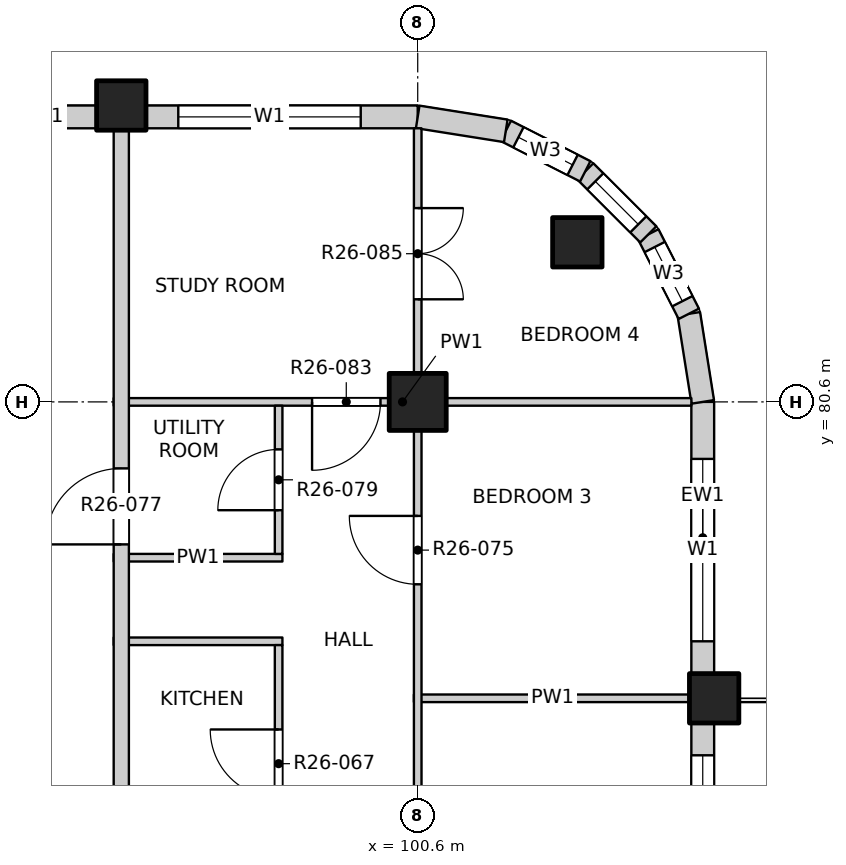
"""IFC4 building model, lengths in metres.
Left out: names, types, materials, properties, quantities, classifications, styles, units other than length and angle.
Written with IfcOpenShell. Run it as: python <this file> out.ifc"""

import sys

from ifc_helpers import new_model, si_unit, direction, frame, frame_2d, origin, origin_2d, place, context, subcontext, project, spatial, rectangle, extrude, element, fill, save


model = new_model("IFC4")
c1 = context("Model", 3, precision=1e-05, world=origin(), true_north=direction((0.0, 1.0)))
c2 = subcontext(c1, "Body", "Model", "MODEL_VIEW")
j1 = project(units=[si_unit("LENGTHUNIT", "METRE"), si_unit("PLANEANGLEUNIT", "RADIAN")], contexts=[c1])
p1 = place(None, origin())
s1 = spatial("IfcSite", under=j1, at=p1, CompositionType="ELEMENT")
p2 = place(p1, origin())
s2 = spatial("IfcBuilding", under=s1, at=p2, CompositionType="ELEMENT")
p3 = place(p2, frame((0.0, 0.0, 259.6)))
s3 = spatial("IfcBuildingStorey", under=s2, at=p3, CompositionType="ELEMENT", Elevation=259.6)
for number, where, z_axis, x_axis in (
    (1, (102.7, 82.7, -0.25), (0.0, 0.0, 1.0), (1.0, 0.0, 0.0)),
    (2, (104.5, 76.7, -0.25), (0.0, 0.0, 1.0), (1.0, 0.0, 0.0)),
    (3, (96.7, 84.5, -0.25), (0.0, 0.0, 1.0), (1.0, 0.0, 0.0)),
):
    element("IfcColumn", number, at=place(p3, frame(where, z_axis=z_axis, x_axis=x_axis)), inside=s3, PredefinedType="COLUMN", context=c2, shape_type="SweptSolid", body=[
        extrude(rectangle(XDim=0.65, YDim=0.65, at=origin_2d()), origin(), (0.0, 0.0, 1.0), 3.4),
    ])
p4 = place(p3, frame((100.6, 80.6, -0.25), z_axis=(0.0, 0.0, 1.0), x_axis=(1.0, 0.0, 0.0)))
e4 = element("IfcColumn", 4, at=p4, inside=s3, PredefinedType="COLUMN", context=c2, shape_type="SweptSolid", body=[
    extrude(rectangle(XDim=0.75, YDim=0.75, at=origin_2d()), origin(), (0.0, 0.0, 1.0), 3.4),
])
p5 = place(p3, frame((104.35, 69.225, 0.0), z_axis=(0.0, 0.0, 1.0), x_axis=(0.0, 1.0, 0.0)))
e5 = element("IfcWall", 5, at=p5, inside=s3, PredefinedType="SOLIDWALL", context=c2, shape_type="SweptSolid", body=[
    extrude(rectangle(XDim=7.15, YDim=0.3, at=frame_2d((3.575, 0.0))), origin(), (0.0, 0.0, 1.0), 3.15),
])
p6 = place(p5, frame((0.725, 0.0, 0.0)))
e6 = element("IfcOpeningElement", 6, at=p6, cuts=e5, PredefinedType="OPENING", context=c2, shape_type="SweptSolid", body=[
    extrude(rectangle(XDim=1.8, YDim=2.4, at=frame_2d((0.9, 1.2))), frame((0.0, 0.16, 0.0), z_axis=(0.0, -1.0, 0.0), x_axis=(1.0, 0.0, 0.0)), (0.0, 0.0, 1.0), 0.32),
])
p7 = place(p5, frame((4.325, 0.0, 0.9)))
e7 = element("IfcOpeningElement", 7, at=p7, cuts=e5, PredefinedType="OPENING", context=c2, shape_type="SweptSolid", body=[
    extrude(rectangle(XDim=2.4, YDim=1.8, at=frame_2d((1.2, 0.9))), frame((0.0, 0.16, 0.0), z_axis=(0.0, -1.0, 0.0), x_axis=(1.0, 0.0, 0.0)), (0.0, 0.0, 1.0), 0.32),
])
p8 = place(p3, frame((104.35, 77.025, 0.0), z_axis=(0.0, 0.0, 1.0), x_axis=(0.0, 1.0, 0.0)))
e8 = element("IfcWall", 8, at=p8, inside=s3, PredefinedType="SOLIDWALL", context=c2, shape_type="SweptSolid", body=[
    extrude(rectangle(XDim=3.575, YDim=0.3, at=frame_2d((1.788, 0.0))), origin(), (0.0, 0.0, 1.0), 3.15),
])
p9 = place(p8, frame((0.425, 0.0, 0.9)))
e9 = element("IfcOpeningElement", 9, at=p9, cuts=e8, PredefinedType="OPENING", context=c2, shape_type="SweptSolid", body=[
    extrude(rectangle(XDim=2.4, YDim=1.8, at=frame_2d((1.2, 0.9))), frame((0.0, 0.16, 0.0), z_axis=(0.0, -1.0, 0.0), x_axis=(1.0, 0.0, 0.0)), (0.0, 0.0, 1.0), 0.32),
])
p10 = place(p3, frame((94.95, 84.35, 0.0), z_axis=(0.0, 0.0, 1.0), x_axis=(1.0, 0.0, 0.0)))
e10 = element("IfcWall", 10, at=p10, inside=s3, PredefinedType="SOLIDWALL", context=c2, shape_type="SweptSolid", body=[
    extrude(rectangle(XDim=1.425, YDim=0.3, at=frame_2d((0.712, 0.0))), origin(), (0.0, 0.0, 1.0), 3.15),
])
p11 = place(p3, frame((97.025, 84.35, 0.0), z_axis=(0.0, 0.0, 1.0), x_axis=(1.0, 0.0, 0.0)))
e11 = element("IfcWall", 11, at=p11, inside=s3, PredefinedType="SOLIDWALL", context=c2, shape_type="SweptSolid", body=[
    extrude(rectangle(XDim=3.575, YDim=0.3, at=frame_2d((1.788, 0.0))), origin(), (0.0, 0.0, 1.0), 3.15),
])
p12 = place(p11, frame((0.425, 0.0, 0.9)))
e12 = element("IfcOpeningElement", 12, at=p12, cuts=e11, PredefinedType="OPENING", context=c2, shape_type="SweptSolid", body=[
    extrude(rectangle(XDim=2.4, YDim=1.8, at=frame_2d((1.2, 0.9))), frame((0.0, 0.16, 0.0), z_axis=(0.0, -1.0, 0.0), x_axis=(1.0, 0.0, 0.0)), (0.0, 0.0, 1.0), 0.32),
])
p13 = place(p3, frame((104.35, 80.6, 0.0), z_axis=(0.0, 0.0, 1.0), x_axis=(-0.156496880861, 0.987678452879, 0.0)))
e13 = element("IfcWall", 13, at=p13, inside=s3, PredefinedType="SOLIDWALL", context=c2, shape_type="SweptSolid", body=[
    extrude(rectangle(XDim=1.173, YDim=0.3, at=frame_2d((0.586, 0.0))), origin(), (0.0, 0.0, 1.0), 3.15),
])
p14 = place(p3, frame((104.167, 81.759, 0.0), z_axis=(0.0, 0.0, 1.0), x_axis=(-0.454025524128, 0.890988677504, 0.0)))
e14 = element("IfcWall", 14, at=p14, inside=s3, PredefinedType="SOLIDWALL", context=c2, shape_type="SweptSolid", body=[
    extrude(rectangle(XDim=1.173, YDim=0.3, at=frame_2d((0.587, 0.0))), origin(), (0.0, 0.0, 1.0), 3.15),
])
p15 = place(p14, frame((0.187, 0.0, 0.9)))
e15 = element("IfcOpeningElement", 15, at=p15, cuts=e14, PredefinedType="OPENING", context=c2, shape_type="SweptSolid", body=[
    extrude(rectangle(XDim=0.8, YDim=1.2, at=frame_2d((0.4, 0.6))), frame((0.0, 0.16, 0.0), z_axis=(0.0, -1.0, 0.0), x_axis=(1.0, 0.0, 0.0)), (0.0, 0.0, 1.0), 0.32),
])
p16 = place(p3, frame((103.634, 82.804, 0.0), z_axis=(0.0, 0.0, 1.0), x_axis=(-0.707106781187, 0.707106781187, 0.0)))
e16 = element("IfcWall", 16, at=p16, inside=s3, PredefinedType="SOLIDWALL", context=c2, shape_type="SweptSolid", body=[
    extrude(rectangle(XDim=1.173, YDim=0.3, at=frame_2d((0.586, 0.0))), origin(), (0.0, 0.0, 1.0), 3.15),
])
p17 = place(p16, frame((0.187, 0.0, 0.9)))
e17 = element("IfcOpeningElement", 17, at=p17, cuts=e16, PredefinedType="OPENING", context=c2, shape_type="SweptSolid", body=[
    extrude(rectangle(XDim=0.8, YDim=1.2, at=frame_2d((0.4, 0.6))), frame((0.0, 0.16, 0.0), z_axis=(0.0, -1.0, 0.0), x_axis=(1.0, 0.0, 0.0)), (0.0, 0.0, 1.0), 0.32),
])
p18 = place(p3, frame((102.804, 83.634, 0.0), z_axis=(0.0, 0.0, 1.0), x_axis=(-0.890988677504, 0.454025524128, 0.0)))
e18 = element("IfcWall", 18, at=p18, inside=s3, PredefinedType="SOLIDWALL", context=c2, shape_type="SweptSolid", body=[
    extrude(rectangle(XDim=1.173, YDim=0.3, at=frame_2d((0.587, 0.0))), origin(), (0.0, 0.0, 1.0), 3.15),
])
p19 = place(p18, frame((0.187, 0.0, 0.9)))
e19 = element("IfcOpeningElement", 19, at=p19, cuts=e18, PredefinedType="OPENING", context=c2, shape_type="SweptSolid", body=[
    extrude(rectangle(XDim=0.8, YDim=1.2, at=frame_2d((0.4, 0.6))), frame((0.0, 0.16, 0.0), z_axis=(0.0, -1.0, 0.0), x_axis=(1.0, 0.0, 0.0)), (0.0, 0.0, 1.0), 0.32),
])
p20 = place(p3, frame((101.759, 84.167, 0.0), z_axis=(0.0, 0.0, 1.0), x_axis=(-0.987678452879, 0.156496880861, 0.0)))
e20 = element("IfcWall", 20, at=p20, inside=s3, PredefinedType="SOLIDWALL", context=c2, shape_type="SweptSolid", body=[
    extrude(rectangle(XDim=1.173, YDim=0.3, at=frame_2d((0.586, 0.0))), origin(), (0.0, 0.0, 1.0), 3.15),
])
p21 = place(p3, frame((100.55, 76.7, 0.0), z_axis=(0.0, 0.0, 1.0), x_axis=(1.0, 0.0, 0.0)))
e21 = element("IfcWall", 21, at=p21, inside=s3, PredefinedType="PARTITIONING", context=c2, shape_type="SweptSolid", body=[
    extrude(rectangle(XDim=3.65, YDim=0.1, at=frame_2d((1.825, 0.0))), origin(), (0.0, 0.0, 1.0), 3.15),
])
for number, where, z_axis, x_axis in (
    (22, (96.6, 77.45, 0.0), (0.0, 0.0, 1.0), (1.0, 0.0, 0.0)),
    (23, (96.6, 78.55, 0.0), (0.0, 0.0, 1.0), (1.0, 0.0, 0.0)),
):
    element("IfcWall", number, at=place(p3, frame(where, z_axis=z_axis, x_axis=x_axis)), inside=s3, PredefinedType="PARTITIONING", context=c2, shape_type="SweptSolid", body=[
        extrude(rectangle(XDim=2.22, YDim=0.1, at=frame_2d((1.11, 0.0))), origin(), (0.0, 0.0, 1.0), 3.15),
    ])
p22 = place(p3, frame((96.6, 80.6, 0.0), z_axis=(0.0, 0.0, 1.0), x_axis=(1.0, 0.0, 0.0)))
e24 = element("IfcWall", 24, at=p22, inside=s3, PredefinedType="PARTITIONING", context=c2, shape_type="SweptSolid", body=[
    extrude(rectangle(XDim=7.6, YDim=0.1, at=frame_2d((3.8, 0.0))), origin(), (0.0, 0.0, 1.0), 3.15),
])
p23 = place(p22, frame((2.61, 0.0, 0.0)))
e25 = element("IfcOpeningElement", 25, at=p23, cuts=e24, PredefinedType="OPENING", context=c2, shape_type="SweptSolid", body=[
    extrude(rectangle(XDim=0.9, YDim=2.1, at=frame_2d((0.45, 1.05))), frame((0.0, 0.06, 0.0), z_axis=(0.0, -1.0, 0.0), x_axis=(1.0, 0.0, 0.0)), (0.0, 0.0, 1.0), 0.12),
])
p24 = place(p3, frame((96.7, 49.5, 0.0), z_axis=(0.0, 0.0, 1.0), x_axis=(0.0, 1.0, 0.0)))
e26 = element("IfcWall", 26, at=p24, inside=s3, PredefinedType="PARTITIONING", context=c2, shape_type="SweptSolid", body=[
    extrude(rectangle(XDim=34.7, YDim=0.2, at=frame_2d((17.35, 0.0))), origin(), (0.0, 0.0, 1.0), 3.15),
])
p25 = place(p24, frame((10.425, 0.0, 0.0)))
e27 = element("IfcOpeningElement", 27, at=p25, cuts=e26, PredefinedType="OPENING", context=c2, shape_type="SweptSolid", body=[
    extrude(rectangle(XDim=1.0, YDim=2.1, at=frame_2d((0.5, 1.05))), frame((0.0, 0.11, 0.0), z_axis=(0.0, -1.0, 0.0), x_axis=(1.0, 0.0, 0.0)), (0.0, 0.0, 1.0), 0.22),
])
p26 = place(p24, frame((29.225, 0.0, 0.0)))
e28 = element("IfcOpeningElement", 28, at=p26, cuts=e26, PredefinedType="OPENING", context=c2, shape_type="SweptSolid", body=[
    extrude(rectangle(XDim=1.0, YDim=2.1, at=frame_2d((0.5, 1.05))), frame((0.0, 0.11, 0.0), z_axis=(0.0, -1.0, 0.0), x_axis=(1.0, 0.0, 0.0)), (0.0, 0.0, 1.0), 0.22),
])
p27 = place(p3, frame((98.77, 59.8, 0.0), z_axis=(0.0, 0.0, 1.0), x_axis=(0.0, 1.0, 0.0)))
e29 = element("IfcWall", 29, at=p27, inside=s3, PredefinedType="PARTITIONING", context=c2, shape_type="SweptSolid", body=[
    extrude(rectangle(XDim=17.6, YDim=0.1, at=frame_2d((8.8, 0.0))), origin(), (0.0, 0.0, 1.0), 3.15),
])
p28 = place(p27, frame((0.975, 0.0, 0.0)))
e30 = element("IfcOpeningElement", 30, at=p28, cuts=e29, PredefinedType="OPENING", context=c2, shape_type="SweptSolid", body=[
    extrude(rectangle(XDim=0.9, YDim=2.1, at=frame_2d((0.45, 1.05))), frame((0.0, 0.06, 0.0), z_axis=(0.0, -1.0, 0.0), x_axis=(1.0, 0.0, 0.0)), (0.0, 0.0, 1.0), 0.12),
])
p29 = place(p27, frame((3.65, 0.0, 0.0)))
e31 = element("IfcOpeningElement", 31, at=p29, cuts=e29, PredefinedType="OPENING", context=c2, shape_type="SweptSolid", body=[
    extrude(rectangle(XDim=0.8, YDim=2.1, at=frame_2d((0.4, 1.05))), frame((0.0, 0.06, 0.0), z_axis=(0.0, -1.0, 0.0), x_axis=(1.0, 0.0, 0.0)), (0.0, 0.0, 1.0), 0.12),
])
p30 = place(p27, frame((6.025, 0.0, 0.0)))
e32 = element("IfcOpeningElement", 32, at=p30, cuts=e29, PredefinedType="OPENING", context=c2, shape_type="SweptSolid", body=[
    extrude(rectangle(XDim=0.8, YDim=2.1, at=frame_2d((0.4, 1.05))), frame((0.0, 0.06, 0.0), z_axis=(0.0, -1.0, 0.0), x_axis=(1.0, 0.0, 0.0)), (0.0, 0.0, 1.0), 0.12),
])
p31 = place(p27, frame((8.1, 0.0, 0.0)))
e33 = element("IfcOpeningElement", 33, at=p31, cuts=e29, PredefinedType="OPENING", context=c2, shape_type="SweptSolid", body=[
    extrude(rectangle(XDim=0.9, YDim=2.1, at=frame_2d((0.45, 1.05))), frame((0.0, 0.06, 0.0), z_axis=(0.0, -1.0, 0.0), x_axis=(1.0, 0.0, 0.0)), (0.0, 0.0, 1.0), 0.12),
])
p32 = place(p27, frame((10.265, 0.0, 0.0)))
e34 = element("IfcOpeningElement", 34, at=p32, cuts=e29, PredefinedType="OPENING", context=c2, shape_type="SweptSolid", body=[
    extrude(rectangle(XDim=0.9, YDim=2.1, at=frame_2d((0.45, 1.05))), frame((0.0, 0.06, 0.0), z_axis=(0.0, -1.0, 0.0), x_axis=(1.0, 0.0, 0.0)), (0.0, 0.0, 1.0), 0.12),
])
p33 = place(p27, frame((12.805, 0.0, 0.0)))
e35 = element("IfcOpeningElement", 35, at=p33, cuts=e29, PredefinedType="OPENING", context=c2, shape_type="SweptSolid", body=[
    extrude(rectangle(XDim=0.8, YDim=2.1, at=frame_2d((0.4, 1.05))), frame((0.0, 0.06, 0.0), z_axis=(0.0, -1.0, 0.0), x_axis=(1.0, 0.0, 0.0)), (0.0, 0.0, 1.0), 0.12),
])
p34 = place(p27, frame((15.59, 0.0, 0.0)))
e36 = element("IfcOpeningElement", 36, at=p34, cuts=e29, PredefinedType="OPENING", context=c2, shape_type="SweptSolid", body=[
    extrude(rectangle(XDim=0.9, YDim=2.1, at=frame_2d((0.45, 1.05))), frame((0.0, 0.06, 0.0), z_axis=(0.0, -1.0, 0.0), x_axis=(1.0, 0.0, 0.0)), (0.0, 0.0, 1.0), 0.12),
])
p35 = place(p3, frame((98.77, 78.6, 0.0), z_axis=(0.0, 0.0, 1.0), x_axis=(0.0, 1.0, 0.0)))
e37 = element("IfcWall", 37, at=p35, inside=s3, PredefinedType="PARTITIONING", context=c2, shape_type="SweptSolid", body=[
    extrude(rectangle(XDim=1.95, YDim=0.1, at=frame_2d((0.975, 0.0))), origin(), (0.0, 0.0, 1.0), 3.15),
])
p36 = place(p35, frame((0.575, 0.0, 0.0)))
e38 = element("IfcOpeningElement", 38, at=p36, cuts=e37, PredefinedType="OPENING", context=c2, shape_type="SweptSolid", body=[
    extrude(rectangle(XDim=0.8, YDim=2.1, at=frame_2d((0.4, 1.05))), frame((0.0, 0.06, 0.0), z_axis=(0.0, -1.0, 0.0), x_axis=(1.0, 0.0, 0.0)), (0.0, 0.0, 1.0), 0.12),
])
p37 = place(p3, frame((100.6, 45.8, 0.0), z_axis=(0.0, 0.0, 1.0), x_axis=(0.0, 1.0, 0.0)))
e39 = element("IfcWall", 39, at=p37, inside=s3, PredefinedType="PARTITIONING", context=c2, shape_type="SweptSolid", body=[
    extrude(rectangle(XDim=38.4, YDim=0.1, at=frame_2d((19.2, 0.0))), origin(), (0.0, 0.0, 1.0), 3.15),
])
p38 = place(p37, frame((1.05, 0.0, 0.0)))
e40 = element("IfcOpeningElement", 40, at=p38, cuts=e39, PredefinedType="OPENING", context=c2, shape_type="SweptSolid", body=[
    extrude(rectangle(XDim=1.2, YDim=2.1, at=frame_2d((0.6, 1.05))), frame((0.0, 0.06, 0.0), z_axis=(0.0, -1.0, 0.0), x_axis=(1.0, 0.0, 0.0)), (0.0, 0.0, 1.0), 0.12),
])
p39 = place(p37, frame((5.1, 0.0, 0.0)))
e41 = element("IfcOpeningElement", 41, at=p39, cuts=e39, PredefinedType="OPENING", context=c2, shape_type="SweptSolid", body=[
    extrude(rectangle(XDim=0.9, YDim=2.1, at=frame_2d((0.45, 1.05))), frame((0.0, 0.06, 0.0), z_axis=(0.0, -1.0, 0.0), x_axis=(1.0, 0.0, 0.0)), (0.0, 0.0, 1.0), 0.12),
])
p40 = place(p37, frame((9.0, 0.0, 0.0)))
e42 = element("IfcOpeningElement", 42, at=p40, cuts=e39, PredefinedType="OPENING", context=c2, shape_type="SweptSolid", body=[
    extrude(rectangle(XDim=0.9, YDim=2.1, at=frame_2d((0.45, 1.05))), frame((0.0, 0.06, 0.0), z_axis=(0.0, -1.0, 0.0), x_axis=(1.0, 0.0, 0.0)), (0.0, 0.0, 1.0), 0.12),
])
p41 = place(p37, frame((12.9, 0.0, 0.0)))
e43 = element("IfcOpeningElement", 43, at=p41, cuts=e39, PredefinedType="OPENING", context=c2, shape_type="SweptSolid", body=[
    extrude(rectangle(XDim=0.9, YDim=2.1, at=frame_2d((0.45, 1.05))), frame((0.0, 0.06, 0.0), z_axis=(0.0, -1.0, 0.0), x_axis=(1.0, 0.0, 0.0)), (0.0, 0.0, 1.0), 0.12),
])
p42 = place(p37, frame((16.8, 0.0, 0.0)))
e44 = element("IfcOpeningElement", 44, at=p42, cuts=e39, PredefinedType="OPENING", context=c2, shape_type="SweptSolid", body=[
    extrude(rectangle(XDim=0.9, YDim=2.1, at=frame_2d((0.45, 1.05))), frame((0.0, 0.06, 0.0), z_axis=(0.0, -1.0, 0.0), x_axis=(1.0, 0.0, 0.0)), (0.0, 0.0, 1.0), 0.12),
])
p43 = place(p37, frame((20.7, 0.0, 0.0)))
e45 = element("IfcOpeningElement", 45, at=p43, cuts=e39, PredefinedType="OPENING", context=c2, shape_type="SweptSolid", body=[
    extrude(rectangle(XDim=0.9, YDim=2.1, at=frame_2d((0.45, 1.05))), frame((0.0, 0.06, 0.0), z_axis=(0.0, -1.0, 0.0), x_axis=(1.0, 0.0, 0.0)), (0.0, 0.0, 1.0), 0.12),
])
p44 = place(p37, frame((24.6, 0.0, 0.0)))
e46 = element("IfcOpeningElement", 46, at=p44, cuts=e39, PredefinedType="OPENING", context=c2, shape_type="SweptSolid", body=[
    extrude(rectangle(XDim=0.9, YDim=2.1, at=frame_2d((0.45, 1.05))), frame((0.0, 0.06, 0.0), z_axis=(0.0, -1.0, 0.0), x_axis=(1.0, 0.0, 0.0)), (0.0, 0.0, 1.0), 0.12),
])
p45 = place(p37, frame((28.5, 0.0, 0.0)))
e47 = element("IfcOpeningElement", 47, at=p45, cuts=e39, PredefinedType="OPENING", context=c2, shape_type="SweptSolid", body=[
    extrude(rectangle(XDim=0.9, YDim=2.1, at=frame_2d((0.45, 1.05))), frame((0.0, 0.06, 0.0), z_axis=(0.0, -1.0, 0.0), x_axis=(1.0, 0.0, 0.0)), (0.0, 0.0, 1.0), 0.12),
])
p46 = place(p37, frame((32.4, 0.0, 0.0)))
e48 = element("IfcOpeningElement", 48, at=p46, cuts=e39, PredefinedType="OPENING", context=c2, shape_type="SweptSolid", body=[
    extrude(rectangle(XDim=0.9, YDim=2.1, at=frame_2d((0.45, 1.05))), frame((0.0, 0.06, 0.0), z_axis=(0.0, -1.0, 0.0), x_axis=(1.0, 0.0, 0.0)), (0.0, 0.0, 1.0), 0.12),
])
p47 = place(p37, frame((36.15, 0.0, 0.0)))
e49 = element("IfcOpeningElement", 49, at=p47, cuts=e39, PredefinedType="OPENING", context=c2, shape_type="SweptSolid", body=[
    extrude(rectangle(XDim=1.2, YDim=2.1, at=frame_2d((0.6, 1.05))), frame((0.0, 0.06, 0.0), z_axis=(0.0, -1.0, 0.0), x_axis=(1.0, 0.0, 0.0)), (0.0, 0.0, 1.0), 0.12),
])
p48 = place(p7, origin())
e50 = element("IfcWindow", 50, at=p48, inside=s3, PartitioningType="DOUBLE_PANEL_VERTICAL", PredefinedType="WINDOW", context=c2, shape_type="SweptSolid", body=[
    extrude(rectangle(XDim=2.4, YDim=1.8, at=frame_2d((1.2, 0.9))), frame((0.0, 0.03, 0.0), z_axis=(0.0, -1.0, 0.0), x_axis=(1.0, 0.0, 0.0)), (0.0, 0.0, 1.0), 0.06),
])
fill(e7, e50)
p49 = place(p9, origin())
e51 = element("IfcWindow", 51, at=p49, inside=s3, PartitioningType="DOUBLE_PANEL_VERTICAL", PredefinedType="WINDOW", context=c2, shape_type="SweptSolid", body=[
    extrude(rectangle(XDim=2.4, YDim=1.8, at=frame_2d((1.2, 0.9))), frame((0.0, 0.03, 0.0), z_axis=(0.0, -1.0, 0.0), x_axis=(1.0, 0.0, 0.0)), (0.0, 0.0, 1.0), 0.06),
])
fill(e9, e51)
p50 = place(p12, origin())
e52 = element("IfcWindow", 52, at=p50, inside=s3, PartitioningType="DOUBLE_PANEL_VERTICAL", PredefinedType="WINDOW", context=c2, shape_type="SweptSolid", body=[
    extrude(rectangle(XDim=2.4, YDim=1.8, at=frame_2d((1.2, 0.9))), frame((0.0, 0.03, 0.0), z_axis=(0.0, -1.0, 0.0), x_axis=(1.0, 0.0, 0.0)), (0.0, 0.0, 1.0), 0.06),
])
fill(e12, e52)
p51 = place(p15, origin())
e53 = element("IfcWindow", 53, at=p51, inside=s3, PartitioningType="SINGLE_PANEL", PredefinedType="WINDOW", context=c2, shape_type="SweptSolid", body=[
    extrude(rectangle(XDim=0.8, YDim=1.2, at=frame_2d((0.4, 0.6))), frame((0.0, 0.03, 0.0), z_axis=(0.0, -1.0, 0.0), x_axis=(1.0, 0.0, 0.0)), (0.0, 0.0, 1.0), 0.06),
])
fill(e15, e53)
p52 = place(p17, origin())
e54 = element("IfcWindow", 54, at=p52, inside=s3, PartitioningType="SINGLE_PANEL", PredefinedType="WINDOW", context=c2, shape_type="SweptSolid", body=[
    extrude(rectangle(XDim=0.8, YDim=1.2, at=frame_2d((0.4, 0.6))), frame((0.0, 0.03, 0.0), z_axis=(0.0, -1.0, 0.0), x_axis=(1.0, 0.0, 0.0)), (0.0, 0.0, 1.0), 0.06),
])
fill(e17, e54)
p53 = place(p19, origin())
e55 = element("IfcWindow", 55, at=p53, inside=s3, PartitioningType="SINGLE_PANEL", PredefinedType="WINDOW", context=c2, shape_type="SweptSolid", body=[
    extrude(rectangle(XDim=0.8, YDim=1.2, at=frame_2d((0.4, 0.6))), frame((0.0, 0.03, 0.0), z_axis=(0.0, -1.0, 0.0), x_axis=(1.0, 0.0, 0.0)), (0.0, 0.0, 1.0), 0.06),
])
fill(e19, e55)
p54 = place(p34, origin())
e56 = element("IfcDoor", 56, at=p54, inside=s3, OperationType="SINGLE_SWING_RIGHT", PredefinedType="DOOR", context=c2, shape_type="SweptSolid", body=[
    extrude(rectangle(XDim=0.9, YDim=2.1, at=frame_2d((0.45, 1.05))), frame((0.0, 0.025, 0.0), z_axis=(0.0, -1.0, 0.0), x_axis=(1.0, 0.0, 0.0)), (0.0, 0.0, 1.0), 0.05),
])
fill(e36, e56)
p55 = place(p46, origin())
e57 = element("IfcDoor", 57, at=p55, inside=s3, OperationType="SINGLE_SWING_RIGHT", PredefinedType="DOOR", context=c2, shape_type="SweptSolid", body=[
    extrude(rectangle(XDim=0.9, YDim=2.1, at=frame_2d((0.45, 1.05))), frame((0.0, 0.025, 0.0), z_axis=(0.0, -1.0, 0.0), x_axis=(1.0, 0.0, 0.0)), (0.0, 0.0, 1.0), 0.05),
])
fill(e48, e57)
p56 = place(p26, origin())
e58 = element("IfcDoor", 58, at=p56, inside=s3, OperationType="SINGLE_SWING_LEFT", PredefinedType="DOOR", context=c2, shape_type="SweptSolid", body=[
    extrude(rectangle(XDim=1.0, YDim=2.1, at=frame_2d((0.5, 1.05))), frame((0.0, 0.025, 0.0), z_axis=(0.0, -1.0, 0.0), x_axis=(1.0, 0.0, 0.0)), (0.0, 0.0, 1.0), 0.05),
])
fill(e28, e58)
p57 = place(p36, origin())
e59 = element("IfcDoor", 59, at=p57, inside=s3, OperationType="SINGLE_SWING_LEFT", PredefinedType="DOOR", context=c2, shape_type="SweptSolid", body=[
    extrude(rectangle(XDim=0.8, YDim=2.1, at=frame_2d((0.4, 1.05))), frame((0.0, 0.025, 0.0), z_axis=(0.0, -1.0, 0.0), x_axis=(1.0, 0.0, 0.0)), (0.0, 0.0, 1.0), 0.05),
])
fill(e38, e59)
p58 = place(p23, origin())
e60 = element("IfcDoor", 60, at=p58, inside=s3, OperationType="SINGLE_SWING_RIGHT", PredefinedType="DOOR", context=c2, shape_type="SweptSolid", body=[
    extrude(rectangle(XDim=0.9, YDim=2.1, at=frame_2d((0.45, 1.05))), frame((0.0, 0.025, 0.0), z_axis=(0.0, -1.0, 0.0), x_axis=(1.0, 0.0, 0.0)), (0.0, 0.0, 1.0), 0.05),
])
fill(e25, e60)
p59 = place(p47, origin())
e61 = element("IfcDoor", 61, at=p59, inside=s3, OperationType="DOUBLE_DOOR_SINGLE_SWING", PredefinedType="DOOR", context=c2, shape_type="SweptSolid", body=[
    extrude(rectangle(XDim=1.2, YDim=2.1, at=frame_2d((0.6, 1.05))), frame((0.0, 0.025, 0.0), z_axis=(0.0, -1.0, 0.0), x_axis=(1.0, 0.0, 0.0)), (0.0, 0.0, 1.0), 0.05),
])
fill(e49, e61)
save(model, sys.argv[1])
